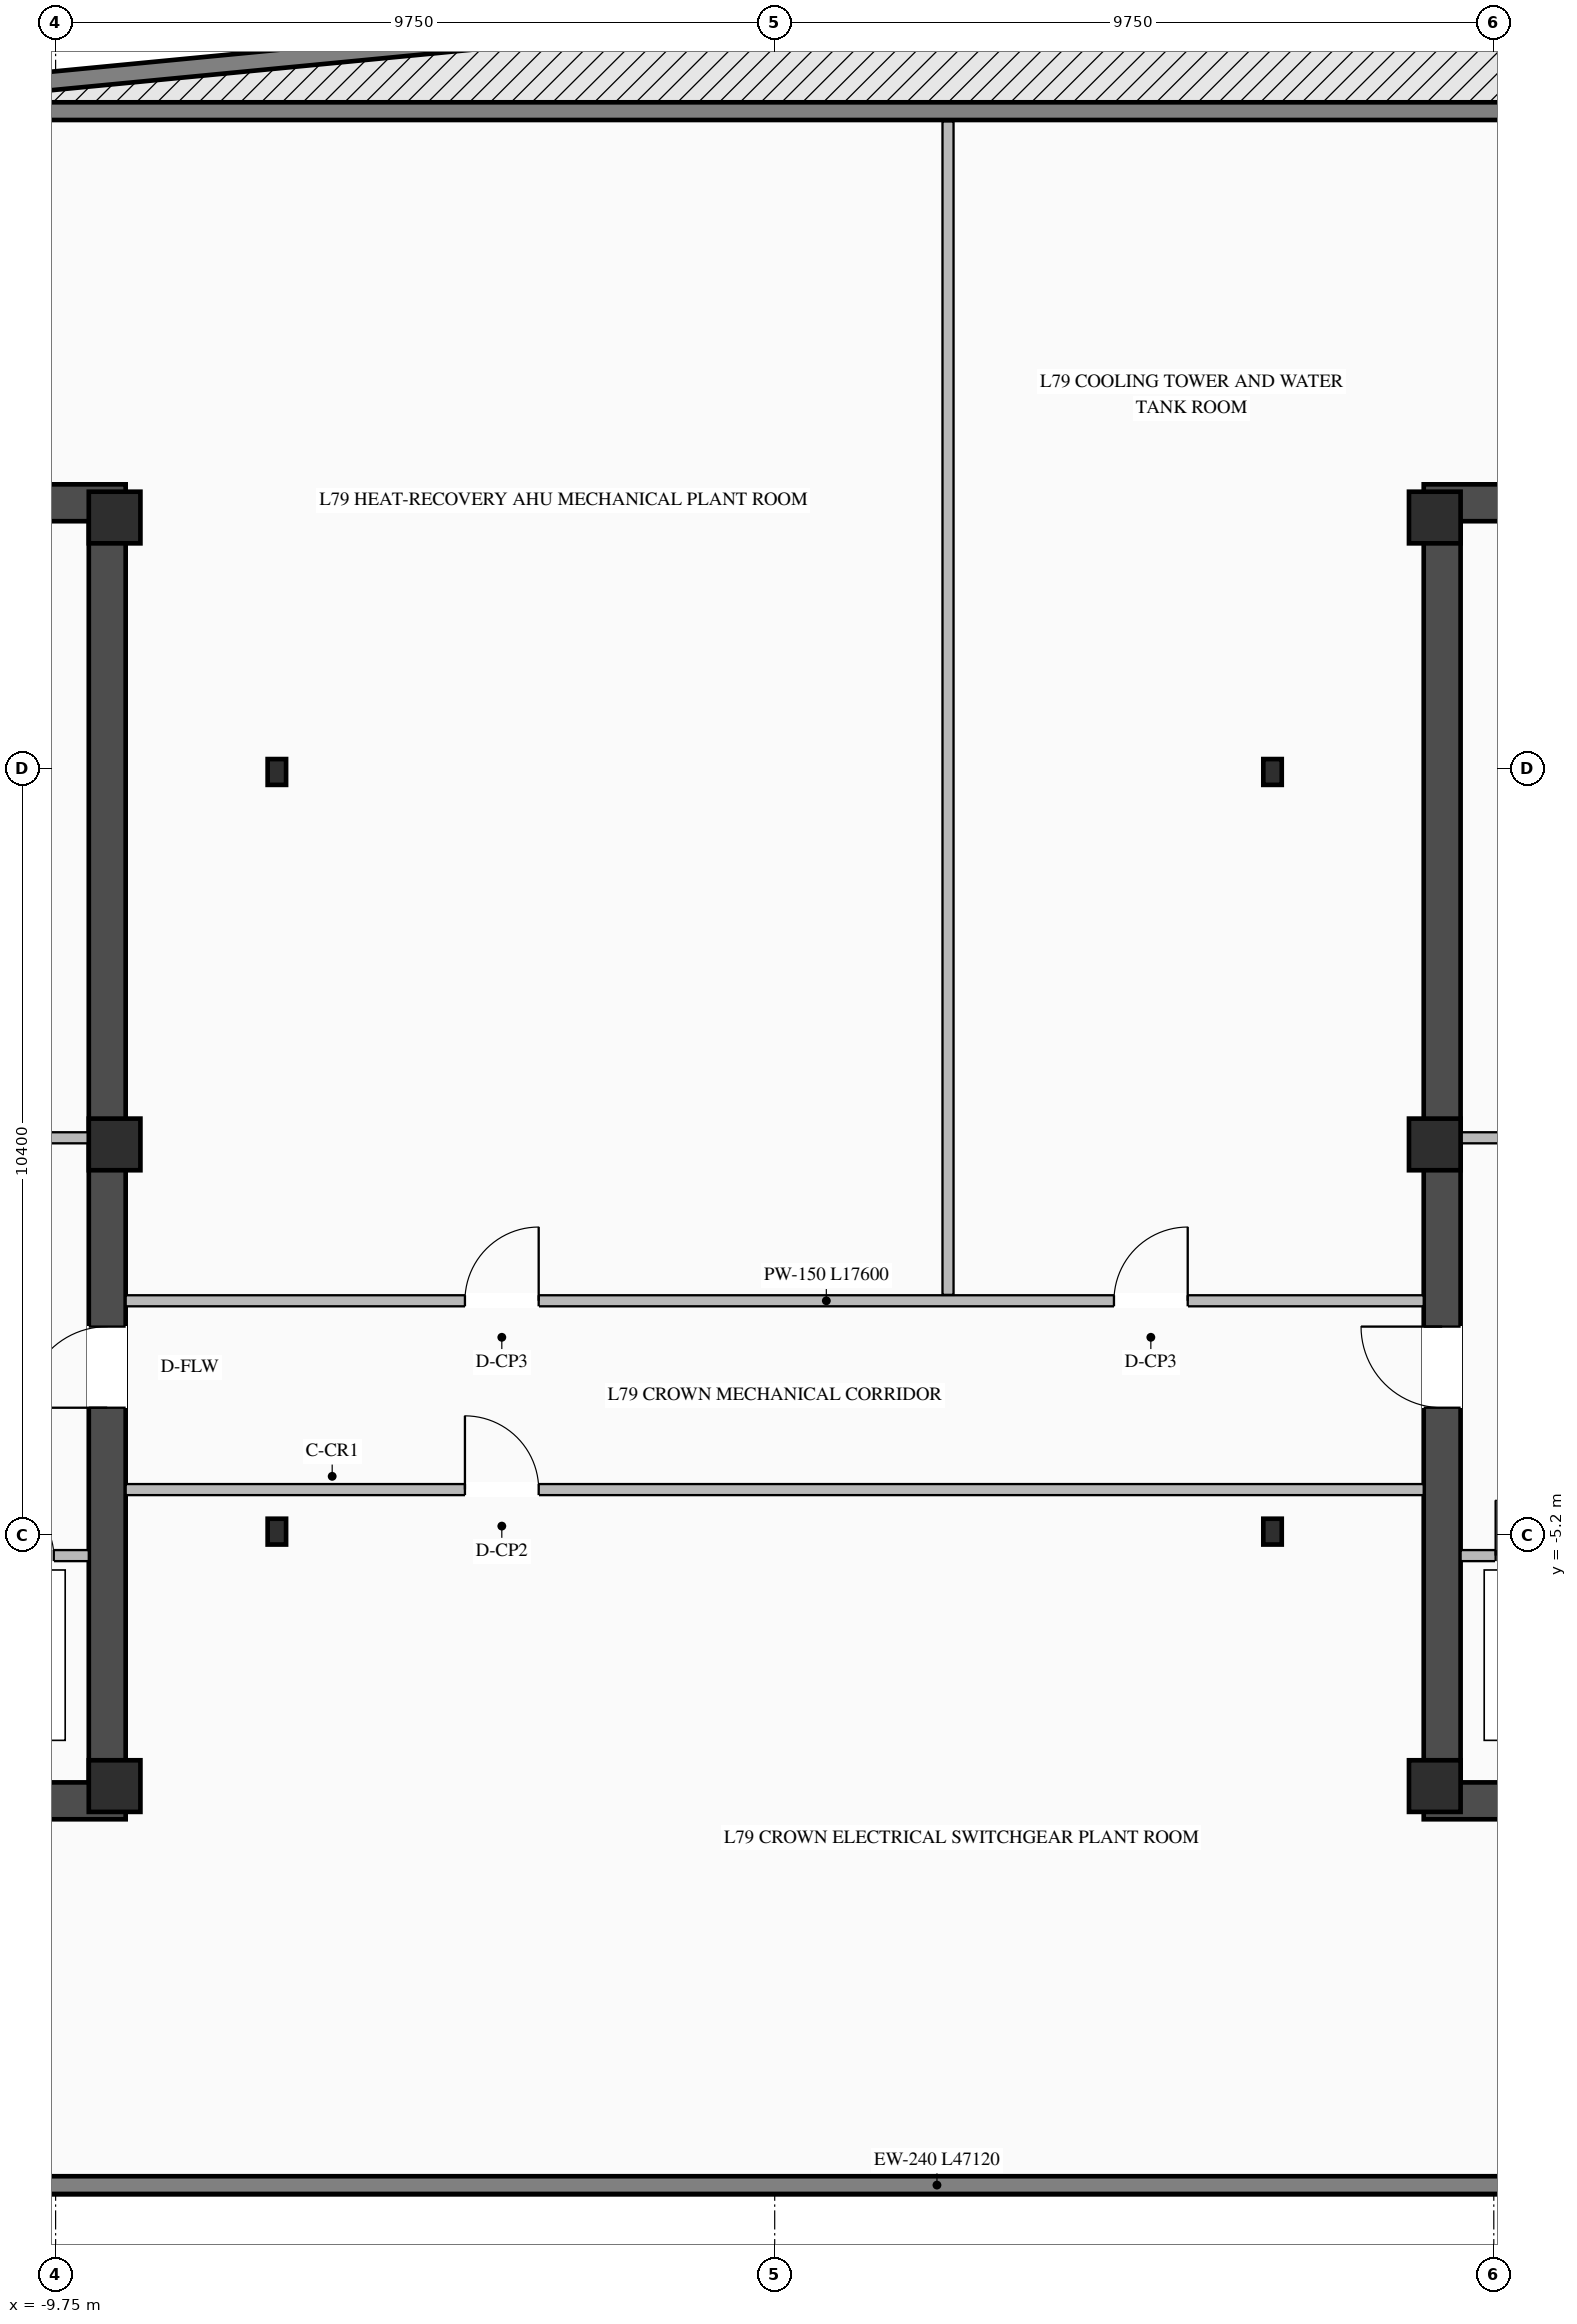
"""IFC4 building model, lengths in metres.
Left out: names, types, materials, properties, quantities, classifications, styles, units other than length and angle.
Written with IfcOpenShell. Run it as: python <this file> out.ifc"""

import sys

from ifc_helpers import new_model, si_unit, direction, frame, frame_2d, origin, origin_2d, place, context, subcontext, project, spatial, rectangle, i_section, extrude, element, fill, save


model = new_model("IFC4")
c1 = context("Model", 3, precision=1e-05, world=origin(), true_north=direction((0.0, 1.0)))
c2 = subcontext(c1, "Body", "Model", "MODEL_VIEW")
j1 = project(units=[si_unit("LENGTHUNIT", "METRE"), si_unit("PLANEANGLEUNIT", "RADIAN")], contexts=[c1])
p1 = place(None, origin())
s1 = spatial("IfcSite", under=j1, at=p1, CompositionType="ELEMENT")
p2 = place(p1, origin())
s2 = spatial("IfcBuilding", under=s1, at=p2, CompositionType="ELEMENT")
p3 = place(p2, frame((0.0, 0.0, 290.55)))
s3 = spatial("IfcBuildingStorey", under=s2, at=p3, CompositionType="ELEMENT", Elevation=290.55)
for number, where, z_axis, x_axis in (
    (1, (-19.05, -8.8, 0.0), (0.0, 0.0, 1.0), (1.0, 0.0, 0.0)),
    (2, (-19.05, 8.8, 0.0), (0.0, 0.0, 1.0), (1.0, 0.0, 0.0)),
):
    element("IfcWall", number, at=place(p3, frame(where, z_axis=z_axis, x_axis=x_axis)), inside=s3, PredefinedType="SHEAR", context=c2, shape_type="SweptSolid", body=[
        extrude(rectangle(XDim=10.25, YDim=0.5, at=frame_2d((5.125, 0.0))), origin(), (0.0, 0.0, 1.0), 3.35),
    ])
p4 = place(p3, frame((-9.05, -8.55, 0.0), z_axis=(0.0, 0.0, 1.0), x_axis=(0.0, 1.0, 0.0)))
e3 = element("IfcWall", 3, at=p4, inside=s3, PredefinedType="SHEAR", context=c2, shape_type="SweptSolid", body=[
    extrude(rectangle(XDim=17.1, YDim=0.5, at=frame_2d((8.55, 0.0))), origin(), (0.0, 0.0, 1.0), 3.35),
])
p5 = place(p4, frame((5.08, 0.0, 0.0)))
e4 = element("IfcOpeningElement", 4, at=p5, cuts=e3, PredefinedType="OPENING", context=c2, shape_type="SweptSolid", body=[
    extrude(rectangle(XDim=1.1, YDim=2.08, at=frame_2d((0.55, 1.04))), frame((0.0, 0.26, 0.0), z_axis=(0.0, -1.0, 0.0), x_axis=(1.0, 0.0, 0.0)), (0.0, 0.0, 1.0), 0.52),
])
for number, where, z_axis, x_axis in (
    (5, (8.8, -8.8, 0.0), (0.0, 0.0, 1.0), (1.0, 0.0, 0.0)),
    (6, (8.8, 8.8, 0.0), (0.0, 0.0, 1.0), (1.0, 0.0, 0.0)),
):
    element("IfcWall", number, at=place(p3, frame(where, z_axis=z_axis, x_axis=x_axis)), inside=s3, PredefinedType="SHEAR", context=c2, shape_type="SweptSolid", body=[
        extrude(rectangle(XDim=10.25, YDim=0.5, at=frame_2d((5.125, 0.0))), origin(), (0.0, 0.0, 1.0), 3.35),
    ])
p6 = place(p3, frame((9.05, -8.55, 0.0), z_axis=(0.0, 0.0, 1.0), x_axis=(0.0, 1.0, 0.0)))
e7 = element("IfcWall", 7, at=p6, inside=s3, PredefinedType="SHEAR", context=c2, shape_type="SweptSolid", body=[
    extrude(rectangle(XDim=17.1, YDim=0.5, at=frame_2d((8.55, 0.0))), origin(), (0.0, 0.0, 1.0), 3.35),
])
p7 = place(p6, frame((5.08, 0.0, 0.0)))
e8 = element("IfcOpeningElement", 8, at=p7, cuts=e7, PredefinedType="OPENING", context=c2, shape_type="SweptSolid", body=[
    extrude(rectangle(XDim=1.1, YDim=2.08, at=frame_2d((0.55, 1.04))), frame((0.0, 0.26, 0.0), z_axis=(0.0, -1.0, 0.0), x_axis=(1.0, 0.0, 0.0)), (0.0, 0.0, 1.0), 0.52),
])
for number, where, z_axis, x_axis in (
    (9, (-8.95, -8.6, 0.0), (0.0, 0.0, 1.0), (1.0, 0.0, 0.0)),
    (10, (-8.95, 0.1, 0.0), (0.0, 0.0, 1.0), (1.0, 0.0, 0.0)),
    (11, (-8.95, 8.6, 0.0), (0.0, 0.0, 1.0), (1.0, 0.0, 0.0)),
    (12, (8.95, -8.6, 0.0), (0.0, 0.0, 1.0), (1.0, 0.0, 0.0)),
    (13, (8.95, 0.1, 0.0), (0.0, 0.0, 1.0), (1.0, 0.0, 0.0)),
    (14, (8.95, 8.6, 0.0), (0.0, 0.0, 1.0), (1.0, 0.0, 0.0)),
):
    element("IfcColumn", number, at=place(p3, frame(where, z_axis=z_axis, x_axis=x_axis)), inside=s3, PredefinedType="COLUMN", context=c2, shape_type="SweptSolid", body=[
        extrude(rectangle(XDim=0.7, YDim=0.7, at=origin_2d()), origin(), (0.0, 0.0, 1.0), 3.6),
    ])
for number, where, z_axis, x_axis in (
    (15, (-6.75, -5.15, 0.0), (0.0, 0.0, 1.0), (1.0, 0.0, 0.0)),
    (16, (-6.75, 5.15, 0.0), (0.0, 0.0, 1.0), (1.0, 0.0, 0.0)),
    (17, (6.75, -5.15, 0.0), (0.0, 0.0, 1.0), (1.0, 0.0, 0.0)),
    (18, (6.75, 5.15, 0.0), (0.0, 0.0, 1.0), (1.0, 0.0, 0.0)),
):
    element("IfcColumn", number, at=place(p3, frame(where, z_axis=z_axis, x_axis=x_axis)), inside=s3, PredefinedType="COLUMN", context=c2, shape_type="SweptSolid", body=[
        extrude(i_section(OverallWidth=0.25, OverallDepth=0.35, WebThickness=0.01, FlangeThickness=0.012, at=origin_2d()), origin(), (0.0, 0.0, 1.0), 3.6),
    ])
for number, where, z_axis, x_axis in (
    (19, (-21.36, -14.01, 0.0), (0.0, 0.0, 1.0), (1.0, 0.0, 0.0)),
    (20, (25.76, 14.11, 0.0), (0.0, 0.0, 1.0), (-1.0, 0.0, 0.0)),
):
    element("IfcWall", number, at=place(p3, frame(where, z_axis=z_axis, x_axis=x_axis)), inside=s3, PredefinedType="STANDARD", context=c2, shape_type="SweptSolid", body=[
        extrude(rectangle(XDim=47.12, YDim=0.24, at=frame_2d((23.56, 0.0))), origin(), (0.0, 0.0, 1.0), 3.33),
    ])
p8 = place(p3, frame((-10.19, 14.482, 0.0), z_axis=(0.0, 0.0, 1.0), x_axis=(0.995396003119, 0.095847780233, 0.0)))
e21 = element("IfcWall", 21, at=p8, inside=s3, PredefinedType="PARAPET", context=c2, shape_type="SweptSolid", body=[
    extrude(rectangle(XDim=36.391, YDim=0.25, at=frame_2d((18.196, 0.0))), origin(), (0.0, 0.0, 1.0), 1.2),
])
p9 = place(p3, frame((-12.895, -5.475, 0.0), z_axis=(0.0, 0.0, 1.0), x_axis=(1.0, 0.0, 0.0)))
e22 = element("IfcWall", 22, at=p9, inside=s3, PredefinedType="STANDARD", context=c2, shape_type="SweptSolid", body=[
    extrude(rectangle(XDim=3.595, YDim=0.15, at=frame_2d((1.797, 0.0))), origin(), (0.0, 0.0, 1.0), 3.33),
])
p10 = place(p9, frame((0.42, 0.0, 0.0)))
e23 = element("IfcOpeningElement", 23, at=p10, cuts=e22, PredefinedType="OPENING", context=c2, shape_type="SweptSolid", body=[
    extrude(rectangle(XDim=1.1, YDim=2.15, at=frame_2d((0.55, 1.075))), frame((0.0, 0.085, 0.0), z_axis=(0.0, -1.0, 0.0), x_axis=(1.0, 0.0, 0.0)), (0.0, 0.0, 1.0), 0.17),
])
p11 = place(p9, frame((2.37, 0.0, 0.0)))
e24 = element("IfcOpeningElement", 24, at=p11, cuts=e22, PredefinedType="OPENING", context=c2, shape_type="SweptSolid", body=[
    extrude(rectangle(XDim=0.75, YDim=2.05, at=frame_2d((0.375, 1.025))), frame((0.0, 0.085, 0.0), z_axis=(0.0, -1.0, 0.0), x_axis=(1.0, 0.0, 0.0)), (0.0, 0.0, 1.0), 0.17),
])
p12 = place(p3, frame((-12.89, 0.19, 0.0), z_axis=(0.0, 0.0, 1.0), x_axis=(1.0, 0.0, 0.0)))
e25 = element("IfcWall", 25, at=p12, inside=s3, PredefinedType="STANDARD", context=c2, shape_type="SweptSolid", body=[
    extrude(rectangle(XDim=3.59, YDim=0.15, at=frame_2d((1.795, 0.0))), origin(), (0.0, 0.0, 1.0), 2.825),
])
p13 = place(p12, frame((0.415, 0.0, 0.0)))
e26 = element("IfcOpeningElement", 26, at=p13, cuts=e25, PredefinedType="OPENING", context=c2, shape_type="SweptSolid", body=[
    extrude(rectangle(XDim=0.85, YDim=2.04, at=frame_2d((0.425, 1.02))), frame((0.0, 0.085, 0.0), z_axis=(0.0, -1.0, 0.0), x_axis=(1.0, 0.0, 0.0)), (0.0, 0.0, 1.0), 0.17),
])
p14 = place(p3, frame((9.3, -5.475, 0.0), z_axis=(0.0, 0.0, 1.0), x_axis=(1.0, 0.0, 0.0)))
e27 = element("IfcWall", 27, at=p14, inside=s3, PredefinedType="STANDARD", context=c2, shape_type="SweptSolid", body=[
    extrude(rectangle(XDim=3.595, YDim=0.15, at=frame_2d((1.797, 0.0))), origin(), (0.0, 0.0, 1.0), 3.33),
])
p15 = place(p14, frame((2.075, 0.0, 0.0)))
e28 = element("IfcOpeningElement", 28, at=p15, cuts=e27, PredefinedType="OPENING", context=c2, shape_type="SweptSolid", body=[
    extrude(rectangle(XDim=1.1, YDim=2.15, at=frame_2d((0.55, 1.075))), frame((0.0, 0.085, 0.0), z_axis=(0.0, -1.0, 0.0), x_axis=(1.0, 0.0, 0.0)), (0.0, 0.0, 1.0), 0.17),
])
p16 = place(p14, frame((0.475, 0.0, 0.0)))
e29 = element("IfcOpeningElement", 29, at=p16, cuts=e27, PredefinedType="OPENING", context=c2, shape_type="SweptSolid", body=[
    extrude(rectangle(XDim=0.75, YDim=2.05, at=frame_2d((0.375, 1.025))), frame((0.0, 0.085, 0.0), z_axis=(0.0, -1.0, 0.0), x_axis=(1.0, 0.0, 0.0)), (0.0, 0.0, 1.0), 0.17),
])
p17 = place(p3, frame((9.3, 0.19, 0.0), z_axis=(0.0, 0.0, 1.0), x_axis=(1.0, 0.0, 0.0)))
e30 = element("IfcWall", 30, at=p17, inside=s3, PredefinedType="STANDARD", context=c2, shape_type="SweptSolid", body=[
    extrude(rectangle(XDim=3.59, YDim=0.15, at=frame_2d((1.795, 0.0))), origin(), (0.0, 0.0, 1.0), 2.825),
])
p18 = place(p17, frame((2.325, 0.0, 0.0)))
e31 = element("IfcOpeningElement", 31, at=p18, cuts=e30, PredefinedType="OPENING", context=c2, shape_type="SweptSolid", body=[
    extrude(rectangle(XDim=0.85, YDim=2.04, at=frame_2d((0.425, 1.02))), frame((0.0, 0.085, 0.0), z_axis=(0.0, -1.0, 0.0), x_axis=(1.0, 0.0, 0.0)), (0.0, 0.0, 1.0), 0.17),
])
p19 = place(p3, frame((-8.8, -2.02, 0.0), z_axis=(0.0, 0.0, 1.0), x_axis=(1.0, 0.0, 0.0)))
e32 = element("IfcWall", 32, at=p19, inside=s3, PredefinedType="STANDARD", context=c2, shape_type="SweptSolid", body=[
    extrude(rectangle(XDim=17.6, YDim=0.15, at=frame_2d((8.8, 0.0))), origin(), (0.0, 0.0, 1.0), 3.33),
])
p20 = place(p19, frame((4.6, 0.0, 0.0)))
e33 = element("IfcOpeningElement", 33, at=p20, cuts=e32, PredefinedType="OPENING", context=c2, shape_type="SweptSolid", body=[
    extrude(rectangle(XDim=1.0, YDim=2.02, at=frame_2d((0.5, 1.01))), frame((0.0, 0.085, 0.0), z_axis=(0.0, -1.0, 0.0), x_axis=(1.0, 0.0, 0.0)), (0.0, 0.0, 1.0), 0.17),
])
p21 = place(p19, frame((13.4, 0.0, 0.0)))
e34 = element("IfcOpeningElement", 34, at=p21, cuts=e32, PredefinedType="OPENING", context=c2, shape_type="SweptSolid", body=[
    extrude(rectangle(XDim=1.0, YDim=2.02, at=frame_2d((0.5, 1.01))), frame((0.0, 0.085, 0.0), z_axis=(0.0, -1.0, 0.0), x_axis=(1.0, 0.0, 0.0)), (0.0, 0.0, 1.0), 0.17),
])
p22 = place(p3, frame((2.35, -1.94, 0.0), z_axis=(0.0, 0.0, 1.0), x_axis=(0.0, 1.0, 0.0)))
e35 = element("IfcWall", 35, at=p22, inside=s3, PredefinedType="STANDARD", context=c2, shape_type="SweptSolid", body=[
    extrude(rectangle(XDim=15.91, YDim=0.15, at=frame_2d((7.955, 0.0))), origin(), (0.0, 0.0, 1.0), 3.33),
])
p23 = place(p3, frame((-8.8, -4.58, 0.0), z_axis=(0.0, 0.0, 1.0), x_axis=(1.0, 0.0, 0.0)))
e36 = element("IfcWall", 36, at=p23, inside=s3, PredefinedType="STANDARD", context=c2, shape_type="SweptSolid", body=[
    extrude(rectangle(XDim=17.6, YDim=0.15, at=frame_2d((8.8, 0.0))), origin(), (0.0, 0.0, 1.0), 3.33),
])
p24 = place(p23, frame((4.6, 0.0, 0.0)))
e37 = element("IfcOpeningElement", 37, at=p24, cuts=e36, PredefinedType="OPENING", context=c2, shape_type="SweptSolid", body=[
    extrude(rectangle(XDim=1.0, YDim=2.02, at=frame_2d((0.5, 1.01))), frame((0.0, 0.085, 0.0), z_axis=(0.0, -1.0, 0.0), x_axis=(1.0, 0.0, 0.0)), (0.0, 0.0, 1.0), 0.17),
])
p25 = place(p11, origin())
e38 = element("IfcDoor", 38, at=p25, inside=s3, OperationType="SINGLE_SWING_LEFT", PredefinedType="DOOR", context=c2, shape_type="SweptSolid", body=[
    extrude(rectangle(XDim=0.75, YDim=2.05, at=frame_2d((0.375, 1.025))), frame((0.0, 0.025, 0.0), z_axis=(0.0, -1.0, 0.0), x_axis=(1.0, 0.0, 0.0)), (0.0, 0.0, 1.0), 0.05),
])
fill(e24, e38)
p26 = place(p5, origin())
e39 = element("IfcDoor", 39, at=p26, inside=s3, OperationType="SINGLE_SWING_LEFT", PredefinedType="DOOR", context=c2, shape_type="SweptSolid", body=[
    extrude(rectangle(XDim=1.1, YDim=2.08, at=frame_2d((0.55, 1.04))), frame((0.0, 0.205, 0.0), z_axis=(0.0, -1.0, 0.0), x_axis=(1.0, 0.0, 0.0)), (0.0, 0.0, 1.0), 0.05),
])
fill(e4, e39)
p27 = place(p16, origin())
e40 = element("IfcDoor", 40, at=p27, inside=s3, OperationType="SINGLE_SWING_LEFT", PredefinedType="DOOR", context=c2, shape_type="SweptSolid", body=[
    extrude(rectangle(XDim=0.75, YDim=2.05, at=frame_2d((0.375, 1.025))), frame((0.0, 0.025, 0.0), z_axis=(0.0, -1.0, 0.0), x_axis=(1.0, 0.0, 0.0)), (0.0, 0.0, 1.0), 0.05),
])
fill(e29, e40)
p28 = place(p7, origin())
e41 = element("IfcDoor", 41, at=p28, inside=s3, OperationType="SINGLE_SWING_RIGHT", PredefinedType="DOOR", context=c2, shape_type="SweptSolid", body=[
    extrude(rectangle(XDim=1.1, YDim=2.08, at=frame_2d((0.55, 1.04))), frame((0.0, -0.155, 0.0), z_axis=(0.0, -1.0, 0.0), x_axis=(1.0, 0.0, 0.0)), (0.0, 0.0, 1.0), 0.05),
])
fill(e8, e41)
p29 = place(p20, origin())
e42 = element("IfcDoor", 42, at=p29, inside=s3, OperationType="SINGLE_SWING_RIGHT", PredefinedType="DOOR", context=c2, shape_type="SweptSolid", body=[
    extrude(rectangle(XDim=1.0, YDim=2.02, at=frame_2d((0.5, 1.01))), frame((0.0, 0.025, 0.0), z_axis=(0.0, -1.0, 0.0), x_axis=(1.0, 0.0, 0.0)), (0.0, 0.0, 1.0), 0.05),
])
fill(e33, e42)
p30 = place(p21, origin())
e43 = element("IfcDoor", 43, at=p30, inside=s3, OperationType="SINGLE_SWING_RIGHT", PredefinedType="DOOR", context=c2, shape_type="SweptSolid", body=[
    extrude(rectangle(XDim=1.0, YDim=2.02, at=frame_2d((0.5, 1.01))), frame((0.0, 0.025, 0.0), z_axis=(0.0, -1.0, 0.0), x_axis=(1.0, 0.0, 0.0)), (0.0, 0.0, 1.0), 0.05),
])
fill(e34, e43)
p31 = place(p24, origin())
e44 = element("IfcDoor", 44, at=p31, inside=s3, OperationType="SINGLE_SWING_LEFT", PredefinedType="DOOR", context=c2, shape_type="SweptSolid", body=[
    extrude(rectangle(XDim=1.0, YDim=2.02, at=frame_2d((0.5, 1.01))), frame((0.0, 0.025, 0.0), z_axis=(0.0, -1.0, 0.0), x_axis=(1.0, 0.0, 0.0)), (0.0, 0.0, 1.0), 0.05),
])
fill(e37, e44)
save(model, sys.argv[1])
